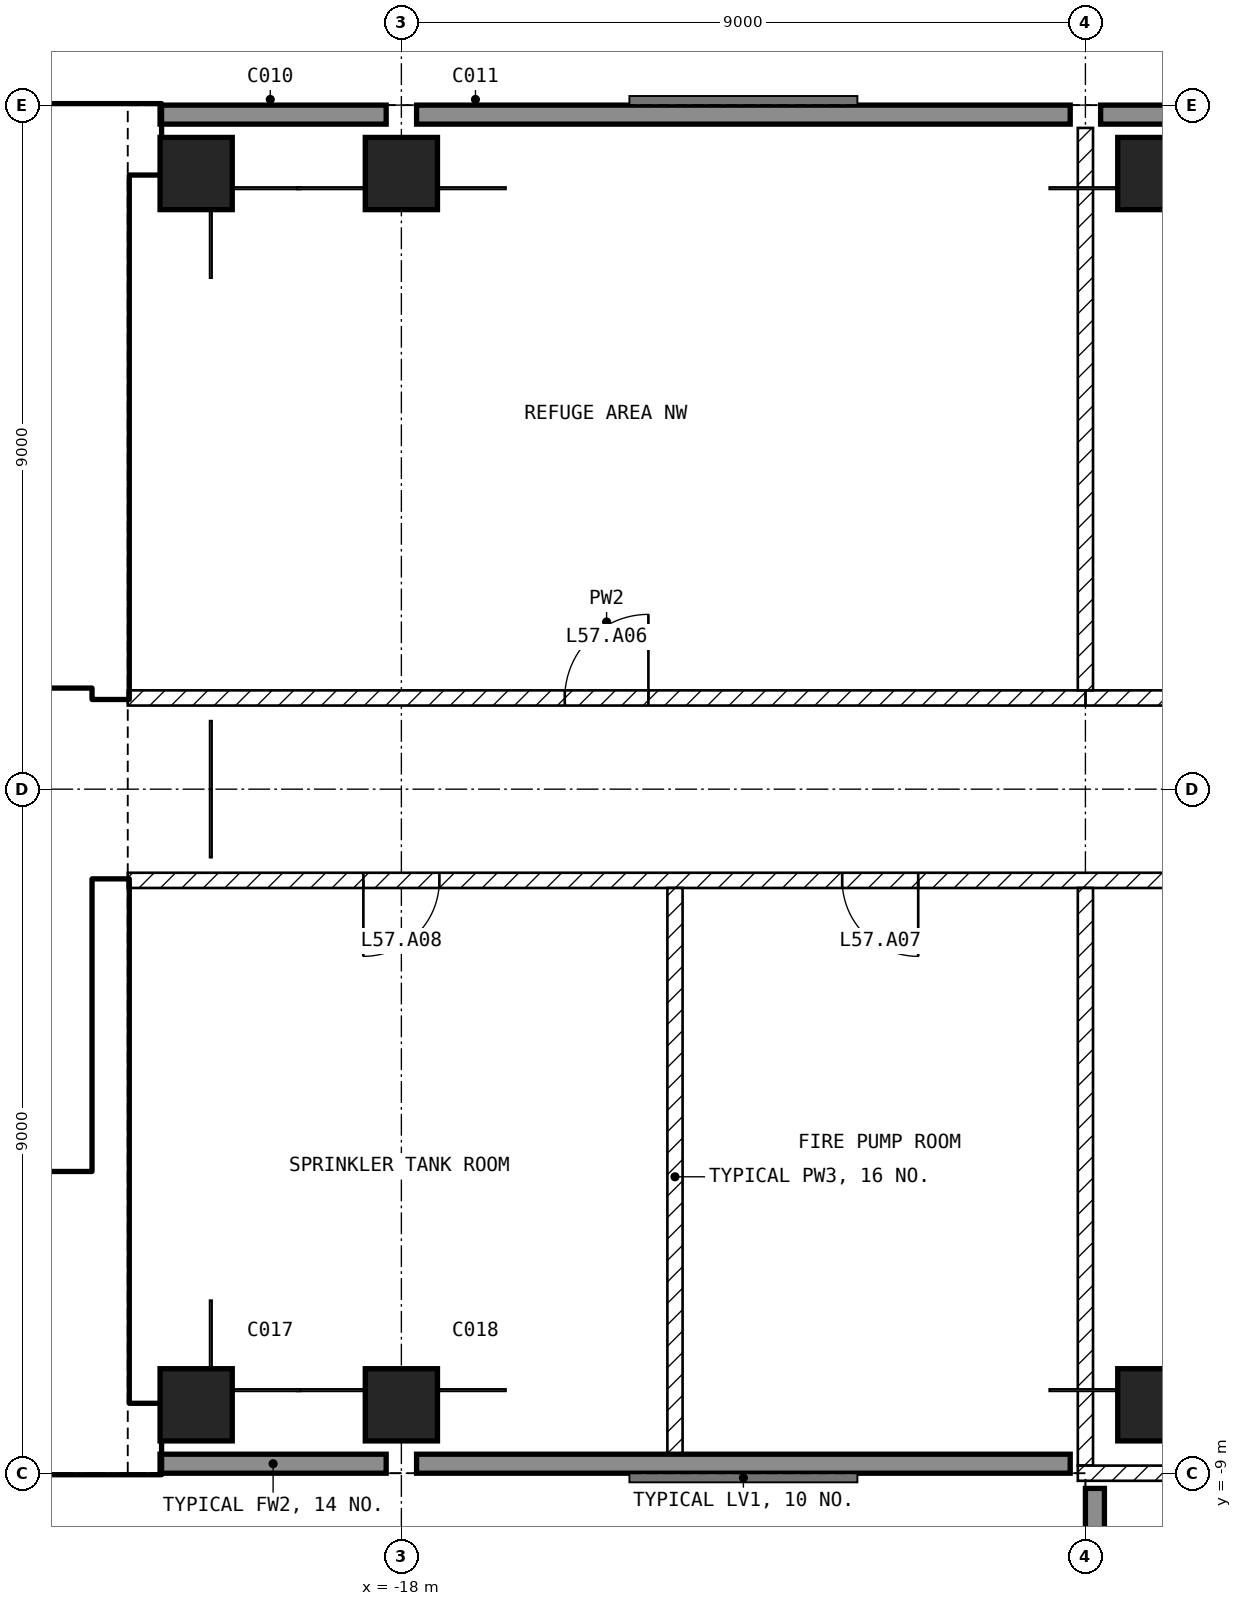
"""IFC4 building model, lengths in metres.
Left out: names, types, materials, properties, quantities, classifications, styles, units other than length and angle.
Written with IfcOpenShell. Run it as: python <this file> out.ifc"""

import sys

from ifc_helpers import new_model, si_unit, direction, frame, frame_2d, origin, origin_2d, place, context, subcontext, project, spatial, rectangle, extrude, element, fill, save


model = new_model("IFC4")
c1 = context("Model", 3, precision=1e-05, world=origin(), true_north=direction((0.0, 1.0)))
c2 = subcontext(c1, "Body", "Model", "MODEL_VIEW")
j1 = project(units=[si_unit("LENGTHUNIT", "METRE"), si_unit("PLANEANGLEUNIT", "RADIAN")], contexts=[c1])
p1 = place(None, origin())
s1 = spatial("IfcSite", under=j1, at=p1, CompositionType="ELEMENT")
p2 = place(p1, origin())
s2 = spatial("IfcBuilding", under=s1, at=p2, CompositionType="ELEMENT")
p3 = place(p2, frame((0.0, 0.0, 228.0)))
s3 = spatial("IfcBuildingStorey", under=s2, at=p3, CompositionType="ELEMENT", Elevation=228.0)
for number, where, z_axis, x_axis in (
    (1, (-20.7, -8.1, -0.45), (0.0, 0.0, 1.0), (1.0, 0.0, 0.0)),
    (2, (-20.7, 8.1, -0.45), (0.0, 0.0, 1.0), (1.0, 0.0, 0.0)),
    (3, (-18.0, -8.1, -0.45), (0.0, 0.0, 1.0), (1.0, 0.0, 0.0)),
    (4, (-18.0, 8.1, -0.45), (0.0, 0.0, 1.0), (1.0, 0.0, 0.0)),
    (5, (-8.1, -8.1, -0.45), (0.0, 0.0, 1.0), (1.0, 0.0, 0.0)),
    (6, (-8.1, 8.1, -0.45), (0.0, 0.0, 1.0), (1.0, 0.0, 0.0)),
):
    element("IfcColumn", number, at=place(p3, frame(where, z_axis=z_axis, x_axis=x_axis)), inside=s3, PredefinedType="COLUMN", context=c2, shape_type="SweptSolid", body=[
        extrude(rectangle(XDim=0.95, YDim=0.95, at=origin_2d()), origin(), (0.0, 0.0, 1.0), 4.7),
    ])
for number, where, z_axis, x_axis in (
    (7, (-0.2, 8.875, 0.0), (0.0, 0.0, 1.0), (-1.0, 0.0, 0.0)),
    (8, (-9.2, 8.875, 0.0), (0.0, 0.0, 1.0), (-1.0, 0.0, 0.0)),
):
    element("IfcWall", number, at=place(p3, frame(where, z_axis=z_axis, x_axis=x_axis)), inside=s3, PredefinedType="SOLIDWALL", context=c2, shape_type="SweptSolid", body=[
        extrude(rectangle(XDim=8.6, YDim=0.25, at=frame_2d((4.3, 0.0))), origin(), (0.0, 0.0, 1.0), 4.25),
    ])
for number, where, z_axis, x_axis in (
    (9, (-18.2, 8.875, 0.0), (0.0, 0.0, 1.0), (-1.0, 0.0, 0.0)),
    (10, (-21.175, -8.875, 0.0), (0.0, 0.0, 1.0), (1.0, 0.0, 0.0)),
):
    element("IfcWall", number, at=place(p3, frame(where, z_axis=z_axis, x_axis=x_axis)), inside=s3, PredefinedType="SOLIDWALL", context=c2, shape_type="SweptSolid", body=[
        extrude(rectangle(XDim=2.975, YDim=0.25, at=frame_2d((1.488, 0.0))), origin(), (0.0, 0.0, 1.0), 4.25),
    ])
p4 = place(p3, frame((-17.8, -8.875, 0.0), z_axis=(0.0, 0.0, 1.0), x_axis=(1.0, 0.0, 0.0)))
e11 = element("IfcWall", 11, at=p4, inside=s3, PredefinedType="SOLIDWALL", context=c2, shape_type="SweptSolid", body=[
    extrude(rectangle(XDim=8.6, YDim=0.25, at=frame_2d((4.3, 0.0))), origin(), (0.0, 0.0, 1.0), 4.25),
])
p5 = place(p3, frame((-8.875, -9.2, 0.0), z_axis=(0.0, 0.0, 1.0), x_axis=(0.0, -1.0, 0.0)))
e12 = element("IfcWall", 12, at=p5, inside=s3, PredefinedType="SOLIDWALL", context=c2, shape_type="SweptSolid", body=[
    extrude(rectangle(XDim=8.6, YDim=0.25, at=frame_2d((4.3, 0.0))), origin(), (0.0, 0.0, 1.0), 4.25),
])
p6 = place(p5, frame((2.8, 0.0, 1.0)))
e13 = element("IfcOpeningElement", 13, at=p6, cuts=e12, PredefinedType="OPENING", context=c2, shape_type="SweptSolid", body=[
    extrude(rectangle(XDim=3.0, YDim=2.4, at=frame_2d((1.5, 1.2))), frame((0.0, 0.135, 0.0), z_axis=(0.0, -1.0, 0.0), x_axis=(1.0, 0.0, 0.0)), (0.0, 0.0, 1.0), 0.27),
])
p7 = place(p3, frame((-30.2, -8.55, 0.0), z_axis=(0.0, 0.0, 1.0), x_axis=(1.0, 0.0, 0.0)))
e14 = element("IfcWall", 14, at=p7, inside=s3, PredefinedType="SHEAR", context=c2, shape_type="SweptSolid", body=[
    extrude(rectangle(XDim=9.025, YDim=0.9, at=frame_2d((4.512, 0.0))), origin(), (0.0, 0.0, 1.0), 4.25),
])
p8 = place(p3, frame((-29.75, 8.55, 0.0), z_axis=(0.0, 0.0, 1.0), x_axis=(1.0, 0.0, 0.0)))
e15 = element("IfcWall", 15, at=p8, inside=s3, PredefinedType="SHEAR", context=c2, shape_type="SweptSolid", body=[
    extrude(rectangle(XDim=8.575, YDim=0.9, at=frame_2d((4.288, 0.0))), origin(), (0.0, 0.0, 1.0), 4.25),
])
for number, where, z_axis, x_axis in (
    (16, (-21.825, -8.1, 0.0), (0.0, 0.0, 1.0), (0.0, 1.0, 0.0)),
    (17, (-21.825, 1.2, 0.0), (0.0, 0.0, 1.0), (0.0, 1.0, 0.0)),
):
    element("IfcWall", number, at=place(p3, frame(where, z_axis=z_axis, x_axis=x_axis)), inside=s3, PredefinedType="SHEAR", context=c2, shape_type="SweptSolid", body=[
        extrude(rectangle(XDim=6.9, YDim=0.45, at=frame_2d((3.45, 0.0))), origin(), (0.0, 0.0, 1.0), 4.25),
    ])
p9 = place(p3, frame((-33.35, 1.45, 0.0), z_axis=(0.0, 0.0, 1.0), x_axis=(1.0, 0.0, 0.0)))
e18 = element("IfcWall", 18, at=p9, inside=s3, PredefinedType="SOLIDWALL", context=c2, shape_type="SweptSolid", body=[
    extrude(rectangle(XDim=11.3, YDim=0.2, at=frame_2d((5.65, 0.0))), origin(), (0.0, 0.0, 1.0), 4.25),
])
p10 = place(p9, frame((9.55, 0.0, 0.0)))
e19 = element("IfcOpeningElement", 19, at=p10, cuts=e18, PredefinedType="OPENING", context=c2, shape_type="SweptSolid", body=[
    extrude(rectangle(XDim=1.0, YDim=2.1, at=frame_2d((0.5, 1.05))), frame((0.0, 0.11, 0.0), z_axis=(0.0, -1.0, 0.0), x_axis=(1.0, 0.0, 0.0)), (0.0, 0.0, 1.0), 0.22),
])
p11 = place(p9, frame((7.05, 0.0, 0.0)))
e20 = element("IfcOpeningElement", 20, at=p11, cuts=e18, PredefinedType="OPENING", context=c2, shape_type="SweptSolid", body=[
    extrude(rectangle(XDim=1.0, YDim=2.1, at=frame_2d((0.5, 1.05))), frame((0.0, 0.11, 0.0), z_axis=(0.0, -1.0, 0.0), x_axis=(1.0, 0.0, 0.0)), (0.0, 0.0, 1.0), 0.22),
])
p12 = place(p9, frame((1.175, 0.0, 0.0)))
e21 = element("IfcOpeningElement", 21, at=p12, cuts=e18, PredefinedType="OPENING", context=c2, shape_type="SweptSolid", body=[
    extrude(rectangle(XDim=0.9, YDim=2.1, at=frame_2d((0.45, 1.05))), frame((0.0, 0.11, 0.0), z_axis=(0.0, -1.0, 0.0), x_axis=(1.0, 0.0, 0.0)), (0.0, 0.0, 1.0), 0.22),
])
p13 = place(p3, frame((-28.35, 5.15, 0.0), z_axis=(0.0, 0.0, 1.0), x_axis=(1.0, 0.0, 0.0)))
e22 = element("IfcWall", 22, at=p13, inside=s3, PredefinedType="SOLIDWALL", context=c2, shape_type="SweptSolid", body=[
    extrude(rectangle(XDim=6.3, YDim=0.2, at=frame_2d((3.15, 0.0))), origin(), (0.0, 0.0, 1.0), 4.25),
])
p14 = place(p13, frame((5.1, 0.0, 0.0)))
e23 = element("IfcOpeningElement", 23, at=p14, cuts=e22, PredefinedType="OPENING", context=c2, shape_type="SweptSolid", body=[
    extrude(rectangle(XDim=1.0, YDim=2.1, at=frame_2d((0.5, 1.05))), frame((0.0, 0.11, 0.0), z_axis=(0.0, -1.0, 0.0), x_axis=(1.0, 0.0, 0.0)), (0.0, 0.0, 1.0), 0.22),
])
p15 = place(p3, frame((-28.35, -5.15, 0.0), z_axis=(0.0, 0.0, 1.0), x_axis=(1.0, 0.0, 0.0)))
e24 = element("IfcWall", 24, at=p15, inside=s3, PredefinedType="SOLIDWALL", context=c2, shape_type="SweptSolid", body=[
    extrude(rectangle(XDim=6.3, YDim=0.2, at=frame_2d((3.15, 0.0))), origin(), (0.0, 0.0, 1.0), 4.25),
])
p16 = place(p15, frame((5.1, 0.0, 0.0)))
e25 = element("IfcOpeningElement", 25, at=p16, cuts=e24, PredefinedType="OPENING", context=c2, shape_type="SweptSolid", body=[
    extrude(rectangle(XDim=1.0, YDim=2.1, at=frame_2d((0.5, 1.05))), frame((0.0, 0.11, 0.0), z_axis=(0.0, -1.0, 0.0), x_axis=(1.0, 0.0, 0.0)), (0.0, 0.0, 1.0), 0.22),
])
p17 = place(p3, frame((-9.0, 1.2, 0.0), z_axis=(0.0, 0.0, 1.0), x_axis=(1.0, 0.0, 0.0)))
e26 = element("IfcWall", 26, at=p17, inside=s3, PredefinedType="PARTITIONING", context=c2, shape_type="SweptSolid", body=[
    extrude(rectangle(XDim=18.0, YDim=0.2, at=frame_2d((9.0, 0.0))), origin(), (0.0, 0.0, 1.0), 4.25),
])
p18 = place(p17, frame((8.5, 0.0, 0.0)))
e27 = element("IfcOpeningElement", 27, at=p18, cuts=e26, PredefinedType="OPENING", context=c2, shape_type="SweptSolid", body=[
    extrude(rectangle(XDim=1.0, YDim=2.1, at=frame_2d((0.5, 1.05))), frame((0.0, 0.11, 0.0), z_axis=(0.0, -1.0, 0.0), x_axis=(1.0, 0.0, 0.0)), (0.0, 0.0, 1.0), 0.22),
])
p19 = place(p3, frame((21.6, -1.2, 0.0), z_axis=(0.0, 0.0, 1.0), x_axis=(-1.0, 0.0, 0.0)))
e28 = element("IfcWall", 28, at=p19, inside=s3, PredefinedType="PARTITIONING", context=c2, shape_type="SweptSolid", body=[
    extrude(rectangle(XDim=43.2, YDim=0.2, at=frame_2d((21.6, 0.0))), origin(), (0.0, 0.0, 1.0), 4.25),
])
p20 = place(p19, frame((21.1, 0.0, 0.0)))
e29 = element("IfcOpeningElement", 29, at=p20, cuts=e28, PredefinedType="OPENING", context=c2, shape_type="SweptSolid", body=[
    extrude(rectangle(XDim=1.0, YDim=2.1, at=frame_2d((0.5, 1.05))), frame((0.0, 0.11, 0.0), z_axis=(0.0, -1.0, 0.0), x_axis=(1.0, 0.0, 0.0)), (0.0, 0.0, 1.0), 0.22),
])
p21 = place(p19, frame((9.4, 0.0, 0.0)))
e30 = element("IfcOpeningElement", 30, at=p21, cuts=e28, PredefinedType="OPENING", context=c2, shape_type="SweptSolid", body=[
    extrude(rectangle(XDim=1.0, YDim=2.1, at=frame_2d((0.5, 1.05))), frame((0.0, 0.11, 0.0), z_axis=(0.0, -1.0, 0.0), x_axis=(1.0, 0.0, 0.0)), (0.0, 0.0, 1.0), 0.22),
])
p22 = place(p19, frame((3.1, 0.0, 0.0)))
e31 = element("IfcOpeningElement", 31, at=p22, cuts=e28, PredefinedType="OPENING", context=c2, shape_type="SweptSolid", body=[
    extrude(rectangle(XDim=1.0, YDim=2.1, at=frame_2d((0.5, 1.05))), frame((0.0, 0.11, 0.0), z_axis=(0.0, -1.0, 0.0), x_axis=(1.0, 0.0, 0.0)), (0.0, 0.0, 1.0), 0.22),
])
p23 = place(p19, frame((32.8, 0.0, 0.0)))
e32 = element("IfcOpeningElement", 32, at=p23, cuts=e28, PredefinedType="OPENING", context=c2, shape_type="SweptSolid", body=[
    extrude(rectangle(XDim=1.0, YDim=2.1, at=frame_2d((0.5, 1.05))), frame((0.0, 0.11, 0.0), z_axis=(0.0, -1.0, 0.0), x_axis=(1.0, 0.0, 0.0)), (0.0, 0.0, 1.0), 0.22),
])
p24 = place(p19, frame((39.1, 0.0, 0.0)))
e33 = element("IfcOpeningElement", 33, at=p24, cuts=e28, PredefinedType="OPENING", context=c2, shape_type="SweptSolid", body=[
    extrude(rectangle(XDim=1.0, YDim=2.1, at=frame_2d((0.5, 1.05))), frame((0.0, 0.11, 0.0), z_axis=(0.0, -1.0, 0.0), x_axis=(1.0, 0.0, 0.0)), (0.0, 0.0, 1.0), 0.22),
])
p25 = place(p3, frame((-21.6, 1.2, 0.0), z_axis=(0.0, 0.0, 1.0), x_axis=(1.0, 0.0, 0.0)))
e34 = element("IfcWall", 34, at=p25, inside=s3, PredefinedType="PARTITIONING", context=c2, shape_type="SweptSolid", body=[
    extrude(rectangle(XDim=12.6, YDim=0.2, at=frame_2d((6.3, 0.0))), origin(), (0.0, 0.0, 1.0), 4.25),
])
p26 = place(p25, frame((5.75, 0.0, 0.0)))
e35 = element("IfcOpeningElement", 35, at=p26, cuts=e34, PredefinedType="OPENING", context=c2, shape_type="SweptSolid", body=[
    extrude(rectangle(XDim=1.1, YDim=2.1, at=frame_2d((0.55, 1.05))), frame((0.0, 0.11, 0.0), z_axis=(0.0, -1.0, 0.0), x_axis=(1.0, 0.0, 0.0)), (0.0, 0.0, 1.0), 0.22),
])
p27 = place(p3, frame((-9.0, 1.3, 0.0), z_axis=(0.0, 0.0, 1.0), x_axis=(0.0, 1.0, 0.0)))
e36 = element("IfcWall", 36, at=p27, inside=s3, PredefinedType="PARTITIONING", context=c2, shape_type="SweptSolid", body=[
    extrude(rectangle(XDim=7.4, YDim=0.2, at=frame_2d((3.7, 0.0))), origin(), (0.0, 0.0, 1.0), 4.25),
])
p28 = place(p3, frame((-9.0, -8.9, 0.0), z_axis=(0.0, 0.0, 1.0), x_axis=(0.0, 1.0, 0.0)))
e37 = element("IfcWall", 37, at=p28, inside=s3, PredefinedType="PARTITIONING", context=c2, shape_type="SweptSolid", body=[
    extrude(rectangle(XDim=7.6, YDim=0.2, at=frame_2d((3.8, 0.0))), origin(), (0.0, 0.0, 1.0), 4.25),
])
p29 = place(p3, frame((9.1, -9.0, 0.0), z_axis=(0.0, 0.0, 1.0), x_axis=(-1.0, 0.0, 0.0)))
e38 = element("IfcWall", 38, at=p29, inside=s3, PredefinedType="PARTITIONING", context=c2, shape_type="SweptSolid", body=[
    extrude(rectangle(XDim=18.2, YDim=0.2, at=frame_2d((9.1, 0.0))), origin(), (0.0, 0.0, 1.0), 4.25),
])
p30 = place(p29, frame((8.6, 0.0, 0.0)))
e39 = element("IfcOpeningElement", 39, at=p30, cuts=e38, PredefinedType="OPENING", context=c2, shape_type="SweptSolid", body=[
    extrude(rectangle(XDim=1.0, YDim=2.1, at=frame_2d((0.5, 1.05))), frame((0.0, 0.11, 0.0), z_axis=(0.0, -1.0, 0.0), x_axis=(1.0, 0.0, 0.0)), (0.0, 0.0, 1.0), 0.22),
])
p31 = place(p3, frame((-14.4, -8.9, 0.0), z_axis=(0.0, 0.0, 1.0), x_axis=(0.0, 1.0, 0.0)))
e40 = element("IfcWall", 40, at=p31, inside=s3, PredefinedType="PARTITIONING", context=c2, shape_type="SweptSolid", body=[
    extrude(rectangle(XDim=7.6, YDim=0.2, at=frame_2d((3.8, 0.0))), origin(), (0.0, 0.0, 1.0), 4.25),
])
p32 = place(p16, origin())
e41 = element("IfcDoor", 41, at=p32, inside=s3, OperationType="SINGLE_SWING_LEFT", PredefinedType="DOOR", context=c2, shape_type="SweptSolid", body=[
    extrude(rectangle(XDim=1.0, YDim=2.1, at=frame_2d((0.5, 1.05))), frame((0.0, 0.025, 0.0), z_axis=(0.0, -1.0, 0.0), x_axis=(1.0, 0.0, 0.0)), (0.0, 0.0, 1.0), 0.05),
])
fill(e25, e41)
p33 = place(p14, origin())
e42 = element("IfcDoor", 42, at=p33, inside=s3, OperationType="SINGLE_SWING_LEFT", PredefinedType="DOOR", context=c2, shape_type="SweptSolid", body=[
    extrude(rectangle(XDim=1.0, YDim=2.1, at=frame_2d((0.5, 1.05))), frame((0.0, 0.025, 0.0), z_axis=(0.0, -1.0, 0.0), x_axis=(1.0, 0.0, 0.0)), (0.0, 0.0, 1.0), 0.05),
])
fill(e23, e42)
p34 = place(p26, origin())
e43 = element("IfcDoor", 43, at=p34, inside=s3, OperationType="SINGLE_SWING_RIGHT", PredefinedType="DOOR", context=c2, shape_type="SweptSolid", body=[
    extrude(rectangle(XDim=1.1, YDim=2.1, at=frame_2d((0.55, 1.05))), frame((0.0, 0.025, 0.0), z_axis=(0.0, -1.0, 0.0), x_axis=(1.0, 0.0, 0.0)), (0.0, 0.0, 1.0), 0.05),
])
fill(e35, e43)
p35 = place(p23, origin())
e44 = element("IfcDoor", 44, at=p35, inside=s3, OperationType="SINGLE_SWING_LEFT", PredefinedType="DOOR", context=c2, shape_type="SweptSolid", body=[
    extrude(rectangle(XDim=1.0, YDim=2.1, at=frame_2d((0.5, 1.05))), frame((0.0, 0.025, 0.0), z_axis=(0.0, -1.0, 0.0), x_axis=(1.0, 0.0, 0.0)), (0.0, 0.0, 1.0), 0.05),
])
fill(e32, e44)
p36 = place(p24, origin())
e45 = element("IfcDoor", 45, at=p36, inside=s3, OperationType="SINGLE_SWING_RIGHT", PredefinedType="DOOR", context=c2, shape_type="SweptSolid", body=[
    extrude(rectangle(XDim=1.0, YDim=2.1, at=frame_2d((0.5, 1.05))), frame((0.0, 0.025, 0.0), z_axis=(0.0, -1.0, 0.0), x_axis=(1.0, 0.0, 0.0)), (0.0, 0.0, 1.0), 0.05),
])
fill(e33, e45)
save(model, sys.argv[1])
